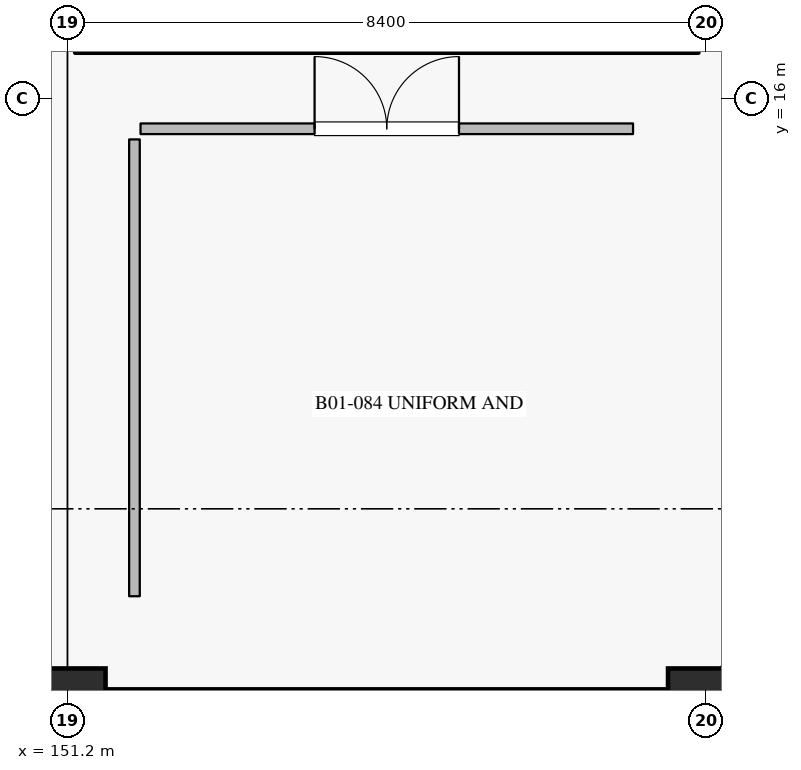
"""IFC4 building model, lengths in metres.
Left out: names, types, materials, properties, quantities, classifications, styles, units other than length and angle.
Written with IfcOpenShell. Run it as: python <this file> out.ifc"""

import sys

from ifc_helpers import new_model, si_unit, direction, frame, frame_2d, origin, origin_2d, place, context, subcontext, project, spatial, rectangle, extrude, element, fill, save


model = new_model("IFC4")
c1 = context("Model", 3, precision=1e-05, world=origin(), true_north=direction((0.0, 1.0)))
c2 = subcontext(c1, "Body", "Model", "MODEL_VIEW")
j1 = project(units=[si_unit("LENGTHUNIT", "METRE"), si_unit("PLANEANGLEUNIT", "RADIAN")], contexts=[c1])
p1 = place(None, origin())
s1 = spatial("IfcSite", under=j1, at=p1, CompositionType="ELEMENT")
p2 = place(p1, origin())
s2 = spatial("IfcBuilding", under=s1, at=p2, CompositionType="ELEMENT")
p3 = place(p2, frame((0.0, 0.0, -5.4)))
s3 = spatial("IfcBuildingStorey", under=s2, at=p3, CompositionType="ELEMENT", Elevation=-5.4)
for number, where, z_axis, x_axis in (
    (1, (151.2, 8.0, 0.0), (0.0, 0.0, 1.0), (1.0, 0.0, 0.0)),
    (2, (159.6, 8.0, 0.0), (0.0, 0.0, 1.0), (1.0, 0.0, 0.0)),
):
    element("IfcColumn", number, at=place(p3, frame(where, z_axis=z_axis, x_axis=x_axis)), inside=s3, PredefinedType="COLUMN", context=c2, shape_type="SweptSolid", body=[
        extrude(rectangle(XDim=1.0, YDim=1.0, at=origin_2d()), origin(), (0.0, 0.0, 1.0), 5.4),
    ])
p4 = place(p3, frame((159.1, 8.0, 0.0), z_axis=(0.0, 0.0, 1.0), x_axis=(-1.0, 0.0, 0.0)))
e3 = element("IfcWall", 3, at=p4, inside=s3, PredefinedType="USERDEFINED", context=c2, shape_type="SweptSolid", body=[
    extrude(rectangle(XDim=7.4, YDim=0.45, at=frame_2d((3.7, 0.0))), origin(), (0.0, 0.0, 1.0), 4.3),
])
p5 = place(p3, frame((152.16, 15.6, 0.0), z_axis=(0.0, 0.0, 1.0), x_axis=(1.0, 0.0, 0.0)))
e4 = element("IfcWall", 4, at=p5, inside=s3, PredefinedType="PARTITIONING", context=c2, shape_type="SweptSolid", body=[
    extrude(rectangle(XDim=6.48, YDim=0.14, at=frame_2d((3.24, 0.0))), origin(), (0.0, 0.0, 1.0), 4.995),
])
p6 = place(p5, frame((2.29, 0.0, 0.0)))
e5 = element("IfcOpeningElement", 5, at=p6, cuts=e4, PredefinedType="OPENING", context=c2, shape_type="SweptSolid", body=[
    extrude(rectangle(XDim=1.9, YDim=2.4, at=frame_2d((0.95, 1.2))), frame((0.0, 0.08, 0.0), z_axis=(0.0, -1.0, 0.0), x_axis=(1.0, 0.0, 0.0)), (0.0, 0.0, 1.0), 0.16),
])
p7 = place(p3, frame((152.08, 9.45, 0.0), z_axis=(0.0, 0.0, 1.0), x_axis=(0.0, 1.0, 0.0)))
e6 = element("IfcWall", 6, at=p7, inside=s3, PredefinedType="PARTITIONING", context=c2, shape_type="SweptSolid", body=[
    extrude(rectangle(XDim=6.01, YDim=0.14, at=frame_2d((3.005, 0.0))), origin(), (0.0, 0.0, 1.0), 4.995),
])
p8 = place(p6, origin())
e7 = element("IfcDoor", 7, at=p8, inside=s3, OperationType="DOUBLE_DOOR_SINGLE_SWING", PredefinedType="DOOR", context=c2, shape_type="SweptSolid", body=[
    extrude(rectangle(XDim=1.9, YDim=2.4, at=frame_2d((0.95, 1.2))), frame((0.0, 0.025, 0.0), z_axis=(0.0, -1.0, 0.0), x_axis=(1.0, 0.0, 0.0)), (0.0, 0.0, 1.0), 0.05),
])
fill(e5, e7)
save(model, sys.argv[1])
